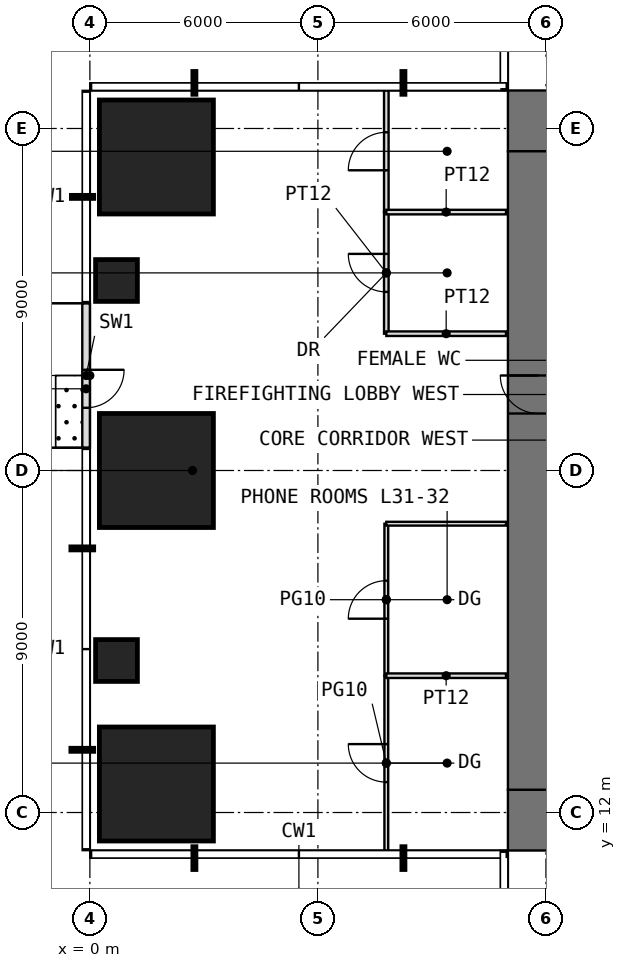
"""IFC4 building model, lengths in metres.
Left out: names, types, materials, properties, quantities, classifications, styles, units other than length and angle.
Written with IfcOpenShell. Run it as: python <this file> out.ifc"""

import sys

from ifc_helpers import new_model, si_unit, direction, frame, frame_2d, origin, origin_2d, place, context, subcontext, project, spatial, rectangle, extrude, element, fill, save


model = new_model("IFC4")
c1 = context("Model", 3, precision=1e-05, world=origin(), true_north=direction((0.0, 1.0)))
c2 = subcontext(c1, "Body", "Model", "MODEL_VIEW")
j1 = project(units=[si_unit("LENGTHUNIT", "METRE"), si_unit("PLANEANGLEUNIT", "RADIAN")], contexts=[c1])
p1 = place(None, origin())
s1 = spatial("IfcSite", under=j1, at=p1, CompositionType="ELEMENT")
p2 = place(p1, origin())
s2 = spatial("IfcBuilding", under=s1, at=p2, CompositionType="ELEMENT")
p3 = place(p2, frame((0.0, 0.0, 132.5)))
s3 = spatial("IfcBuildingStorey", under=s2, at=p3, CompositionType="ELEMENT", Elevation=132.5)
p4 = place(p3, frame((1.75, 12.75, 0.0), z_axis=(0.0, 0.0, 1.0), x_axis=(1.0, 0.0, 0.0)))
e1 = element("IfcColumn", 1, at=p4, inside=s3, PredefinedType="COLUMN", context=c2, shape_type="SweptSolid", body=[
    extrude(rectangle(XDim=3.0, YDim=3.0, at=origin_2d()), origin(), (0.0, 0.0, 1.0), 4.0),
])
p5 = place(p3, frame((0.7, 16.0, 0.0), z_axis=(0.0, 0.0, 1.0), x_axis=(1.0, 0.0, 0.0)))
e2 = element("IfcColumn", 2, at=p5, inside=s3, PredefinedType="COLUMN", context=c2, shape_type="SweptSolid", body=[
    extrude(rectangle(XDim=1.1, YDim=1.1, at=origin_2d()), origin(), (0.0, 0.0, 1.0), 4.0),
])
p6 = place(p3, frame((1.75, 21.0, 0.0), z_axis=(0.0, 0.0, 1.0), x_axis=(1.0, 0.0, 0.0)))
e3 = element("IfcColumn", 3, at=p6, inside=s3, PredefinedType="COLUMN", context=c2, shape_type="SweptSolid", body=[
    extrude(rectangle(XDim=3.0, YDim=3.0, at=origin_2d()), origin(), (0.0, 0.0, 1.0), 4.0),
])
p7 = place(p3, frame((0.7, 26.0, 0.0), z_axis=(0.0, 0.0, 1.0), x_axis=(1.0, 0.0, 0.0)))
e4 = element("IfcColumn", 4, at=p7, inside=s3, PredefinedType="COLUMN", context=c2, shape_type="SweptSolid", body=[
    extrude(rectangle(XDim=1.1, YDim=1.1, at=origin_2d()), origin(), (0.0, 0.0, 1.0), 4.0),
])
p8 = place(p3, frame((1.75, 29.25, 0.0), z_axis=(0.0, 0.0, 1.0), x_axis=(1.0, 0.0, 0.0)))
e5 = element("IfcColumn", 5, at=p8, inside=s3, PredefinedType="COLUMN", context=c2, shape_type="SweptSolid", body=[
    extrude(rectangle(XDim=3.0, YDim=3.0, at=origin_2d()), origin(), (0.0, 0.0, 1.0), 4.0),
])
p9 = place(p3, frame((-0.1, 25.4, 0.0), z_axis=(0.0, 0.0, 1.0), x_axis=(0.0, -1.0, 0.0)))
e6 = element("IfcWall", 6, at=p9, inside=s3, PredefinedType="USERDEFINED", context=c2, shape_type="SweptSolid", body=[
    extrude(rectangle(XDim=3.8, YDim=0.2, at=frame_2d((1.9, 0.0))), origin(), (0.0, 0.0, 1.0), 3.75),
])
p10 = place(p9, frame((1.75, 0.0, 0.0)))
e7 = element("IfcOpeningElement", 7, at=p10, cuts=e6, PredefinedType="OPENING", context=c2, shape_type="SweptSolid", body=[
    extrude(rectangle(XDim=1.0, YDim=2.4, at=frame_2d((0.5, 1.2))), frame((0.0, 0.11, 0.0), z_axis=(0.0, -1.0, 0.0), x_axis=(1.0, 0.0, 0.0)), (0.0, 0.0, 1.0), 0.22),
])
p11 = place(p3, frame((11.0, 11.8, -0.05), z_axis=(0.0, 0.0, 1.0), x_axis=(1.0, 0.0, 0.0)))
e8 = element("IfcWall", 8, at=p11, inside=s3, PredefinedType="SHEAR", context=c2, shape_type="SweptSolid", body=[
    extrude(rectangle(XDim=20.0, YDim=1.6, at=frame_2d((10.0, 0.0))), origin(), (0.0, 0.0, 1.0), 4.0),
])
p12 = place(p11, frame((9.0, 0.0, 0.05)))
e9 = element("IfcOpeningElement", 9, at=p12, cuts=e8, PredefinedType="OPENING", context=c2, shape_type="SweptSolid", body=[
    extrude(rectangle(XDim=2.0, YDim=2.2, at=frame_2d((1.0, 1.1))), frame((0.0, 0.81, 0.0), z_axis=(0.0, -1.0, 0.0), x_axis=(1.0, 0.0, 0.0)), (0.0, 0.0, 1.0), 1.62),
])
p13 = place(p3, frame((11.0, 30.2, -0.05), z_axis=(0.0, 0.0, 1.0), x_axis=(1.0, 0.0, 0.0)))
e10 = element("IfcWall", 10, at=p13, inside=s3, PredefinedType="SHEAR", context=c2, shape_type="SweptSolid", body=[
    extrude(rectangle(XDim=20.0, YDim=1.6, at=frame_2d((10.0, 0.0))), origin(), (0.0, 0.0, 1.0), 4.0),
])
p14 = place(p13, frame((9.0, 0.0, 0.05)))
e11 = element("IfcOpeningElement", 11, at=p14, cuts=e10, PredefinedType="OPENING", context=c2, shape_type="SweptSolid", body=[
    extrude(rectangle(XDim=2.0, YDim=2.2, at=frame_2d((1.0, 1.1))), frame((0.0, 0.81, 0.0), z_axis=(0.0, -1.0, 0.0), x_axis=(1.0, 0.0, 0.0)), (0.0, 0.0, 1.0), 1.62),
])
p15 = place(p3, frame((11.8, 12.6, -0.05), z_axis=(0.0, 0.0, 1.0), x_axis=(0.0, 1.0, 0.0)))
e12 = element("IfcWall", 12, at=p15, inside=s3, PredefinedType="SHEAR", context=c2, shape_type="SweptSolid", body=[
    extrude(rectangle(XDim=16.8, YDim=1.6, at=frame_2d((8.4, 0.0))), origin(), (0.0, 0.0, 1.0), 4.0),
])
p16 = place(p15, frame((9.9, 0.0, 0.05)))
e13 = element("IfcOpeningElement", 13, at=p16, cuts=e12, PredefinedType="OPENING", context=c2, shape_type="SweptSolid", body=[
    extrude(rectangle(XDim=1.0, YDim=2.2, at=frame_2d((0.5, 1.1))), frame((0.0, 0.81, 0.0), z_axis=(0.0, -1.0, 0.0), x_axis=(1.0, 0.0, 0.0)), (0.0, 0.0, 1.0), 1.62),
])
p17 = place(p3, frame((7.8, 11.0, 0.0), z_axis=(0.0, 0.0, 1.0), x_axis=(0.0, 1.0, 0.0)))
e14 = element("IfcWall", 14, at=p17, inside=s3, PredefinedType="PARTITIONING", context=c2, shape_type="SweptSolid", body=[
    extrude(rectangle(XDim=4.6, YDim=0.1, at=frame_2d((2.3, 0.0))), origin(), (0.0, 0.0, 1.0), 3.75),
])
p18 = place(p17, frame((1.8, 0.0, 0.0)))
e15 = element("IfcOpeningElement", 15, at=p18, cuts=e14, PredefinedType="OPENING", context=c2, shape_type="SweptSolid", body=[
    extrude(rectangle(XDim=1.0, YDim=2.4, at=frame_2d((0.5, 1.2))), frame((0.0, 0.06, 0.0), z_axis=(0.0, -1.0, 0.0), x_axis=(1.0, 0.0, 0.0)), (0.0, 0.0, 1.0), 0.12),
])
p19 = place(p3, frame((7.8, 15.6, 0.0), z_axis=(0.0, 0.0, 1.0), x_axis=(0.0, 1.0, 0.0)))
e16 = element("IfcWall", 16, at=p19, inside=s3, PredefinedType="PARTITIONING", context=c2, shape_type="SweptSolid", body=[
    extrude(rectangle(XDim=4.0, YDim=0.1, at=frame_2d((2.0, 0.0))), origin(), (0.0, 0.0, 1.0), 3.75),
])
p20 = place(p19, frame((1.5, 0.0, 0.0)))
e17 = element("IfcOpeningElement", 17, at=p20, cuts=e16, PredefinedType="OPENING", context=c2, shape_type="SweptSolid", body=[
    extrude(rectangle(XDim=1.0, YDim=2.4, at=frame_2d((0.5, 1.2))), frame((0.0, 0.06, 0.0), z_axis=(0.0, -1.0, 0.0), x_axis=(1.0, 0.0, 0.0)), (0.0, 0.0, 1.0), 0.12),
])
p21 = place(p3, frame((7.8, 15.6, 0.0), z_axis=(0.0, 0.0, 1.0), x_axis=(1.0, 0.0, 0.0)))
e18 = element("IfcWall", 18, at=p21, inside=s3, PredefinedType="PARTITIONING", context=c2, shape_type="SweptSolid", body=[
    extrude(rectangle(XDim=3.15, YDim=0.12, at=frame_2d((1.575, 0.0))), origin(), (0.0, 0.0, 1.0), 3.75),
])
p22 = place(p3, frame((7.8, 19.6, 0.0), z_axis=(0.0, 0.0, 1.0), x_axis=(1.0, 0.0, 0.0)))
e19 = element("IfcWall", 19, at=p22, inside=s3, PredefinedType="PARTITIONING", context=c2, shape_type="SweptSolid", body=[
    extrude(rectangle(XDim=3.15, YDim=0.1, at=frame_2d((1.575, 0.0))), origin(), (0.0, 0.0, 1.0), 3.75),
])
p23 = place(p3, frame((7.8, 24.6, 0.0), z_axis=(0.0, 0.0, 1.0), x_axis=(0.0, 1.0, 0.0)))
e20 = element("IfcWall", 20, at=p23, inside=s3, PredefinedType="PARTITIONING", context=c2, shape_type="SweptSolid", body=[
    extrude(rectangle(XDim=3.2, YDim=0.12, at=frame_2d((1.6, 0.0))), origin(), (0.0, 0.0, 1.0), 3.75),
])
p24 = place(p23, frame((1.1, 0.0, 0.0)))
e21 = element("IfcOpeningElement", 21, at=p24, cuts=e20, PredefinedType="OPENING", context=c2, shape_type="SweptSolid", body=[
    extrude(rectangle(XDim=1.0, YDim=2.2, at=frame_2d((0.5, 1.1))), frame((0.0, 0.07, 0.0), z_axis=(0.0, -1.0, 0.0), x_axis=(1.0, 0.0, 0.0)), (0.0, 0.0, 1.0), 0.14),
])
p25 = place(p3, frame((7.8, 24.6, 0.0), z_axis=(0.0, 0.0, 1.0), x_axis=(1.0, 0.0, 0.0)))
e22 = element("IfcWall", 22, at=p25, inside=s3, PredefinedType="PARTITIONING", context=c2, shape_type="SweptSolid", body=[
    extrude(rectangle(XDim=3.15, YDim=0.12, at=frame_2d((1.575, 0.0))), origin(), (0.0, 0.0, 1.0), 3.75),
])
p26 = place(p3, frame((7.8, 27.8, 0.0), z_axis=(0.0, 0.0, 1.0), x_axis=(0.0, 1.0, 0.0)))
e23 = element("IfcWall", 23, at=p26, inside=s3, PredefinedType="PARTITIONING", context=c2, shape_type="SweptSolid", body=[
    extrude(rectangle(XDim=3.2, YDim=0.12, at=frame_2d((1.6, 0.0))), origin(), (0.0, 0.0, 1.0), 3.75),
])
p27 = place(p26, frame((1.1, 0.0, 0.0)))
e24 = element("IfcOpeningElement", 24, at=p27, cuts=e23, PredefinedType="OPENING", context=c2, shape_type="SweptSolid", body=[
    extrude(rectangle(XDim=1.0, YDim=2.2, at=frame_2d((0.5, 1.1))), frame((0.0, 0.07, 0.0), z_axis=(0.0, -1.0, 0.0), x_axis=(1.0, 0.0, 0.0)), (0.0, 0.0, 1.0), 0.14),
])
p28 = place(p3, frame((7.8, 27.8, 0.0), z_axis=(0.0, 0.0, 1.0), x_axis=(1.0, 0.0, 0.0)))
e25 = element("IfcWall", 25, at=p28, inside=s3, PredefinedType="PARTITIONING", context=c2, shape_type="SweptSolid", body=[
    extrude(rectangle(XDim=3.15, YDim=0.12, at=frame_2d((1.575, 0.0))), origin(), (0.0, 0.0, 1.0), 3.75),
])
p29 = place(p10, origin())
e26 = element("IfcDoor", 26, at=p29, inside=s3, OperationType="SINGLE_SWING_LEFT", PredefinedType="DOOR", context=c2, shape_type="SweptSolid", body=[
    extrude(rectangle(XDim=1.0, YDim=2.4, at=frame_2d((0.5, 1.2))), frame((0.0, 0.025, 0.0), z_axis=(0.0, -1.0, 0.0), x_axis=(1.0, 0.0, 0.0)), (0.0, 0.0, 1.0), 0.05),
])
fill(e7, e26)
p30 = place(p16, origin())
e27 = element("IfcDoor", 27, at=p30, inside=s3, OperationType="SINGLE_SWING_RIGHT", PredefinedType="DOOR", context=c2, shape_type="SweptSolid", body=[
    extrude(rectangle(XDim=1.0, YDim=2.2, at=frame_2d((0.5, 1.1))), frame((0.0, 0.025, 0.0), z_axis=(0.0, -1.0, 0.0), x_axis=(1.0, 0.0, 0.0)), (0.0, 0.0, 1.0), 0.05),
])
fill(e13, e27)
p31 = place(p18, origin())
e28 = element("IfcDoor", 28, at=p31, inside=s3, OperationType="SINGLE_SWING_RIGHT", PredefinedType="DOOR", context=c2, shape_type="SweptSolid", body=[
    extrude(rectangle(XDim=1.0, YDim=2.4, at=frame_2d((0.5, 1.2))), frame((0.0, 0.025, 0.0), z_axis=(0.0, -1.0, 0.0), x_axis=(1.0, 0.0, 0.0)), (0.0, 0.0, 1.0), 0.05),
])
fill(e15, e28)
p32 = place(p20, origin())
e29 = element("IfcDoor", 29, at=p32, inside=s3, OperationType="SINGLE_SWING_LEFT", PredefinedType="DOOR", context=c2, shape_type="SweptSolid", body=[
    extrude(rectangle(XDim=1.0, YDim=2.4, at=frame_2d((0.5, 1.2))), frame((0.0, 0.025, 0.0), z_axis=(0.0, -1.0, 0.0), x_axis=(1.0, 0.0, 0.0)), (0.0, 0.0, 1.0), 0.05),
])
fill(e17, e29)
p33 = place(p24, origin())
e30 = element("IfcDoor", 30, at=p33, inside=s3, OperationType="SINGLE_SWING_RIGHT", PredefinedType="DOOR", context=c2, shape_type="SweptSolid", body=[
    extrude(rectangle(XDim=1.0, YDim=2.2, at=frame_2d((0.5, 1.1))), frame((0.0, 0.025, 0.0), z_axis=(0.0, -1.0, 0.0), x_axis=(1.0, 0.0, 0.0)), (0.0, 0.0, 1.0), 0.05),
])
fill(e21, e30)
p34 = place(p27, origin())
e31 = element("IfcDoor", 31, at=p34, inside=s3, OperationType="SINGLE_SWING_LEFT", PredefinedType="DOOR", context=c2, shape_type="SweptSolid", body=[
    extrude(rectangle(XDim=1.0, YDim=2.2, at=frame_2d((0.5, 1.1))), frame((0.0, 0.025, 0.0), z_axis=(0.0, -1.0, 0.0), x_axis=(1.0, 0.0, 0.0)), (0.0, 0.0, 1.0), 0.05),
])
fill(e24, e31)
save(model, sys.argv[1])
